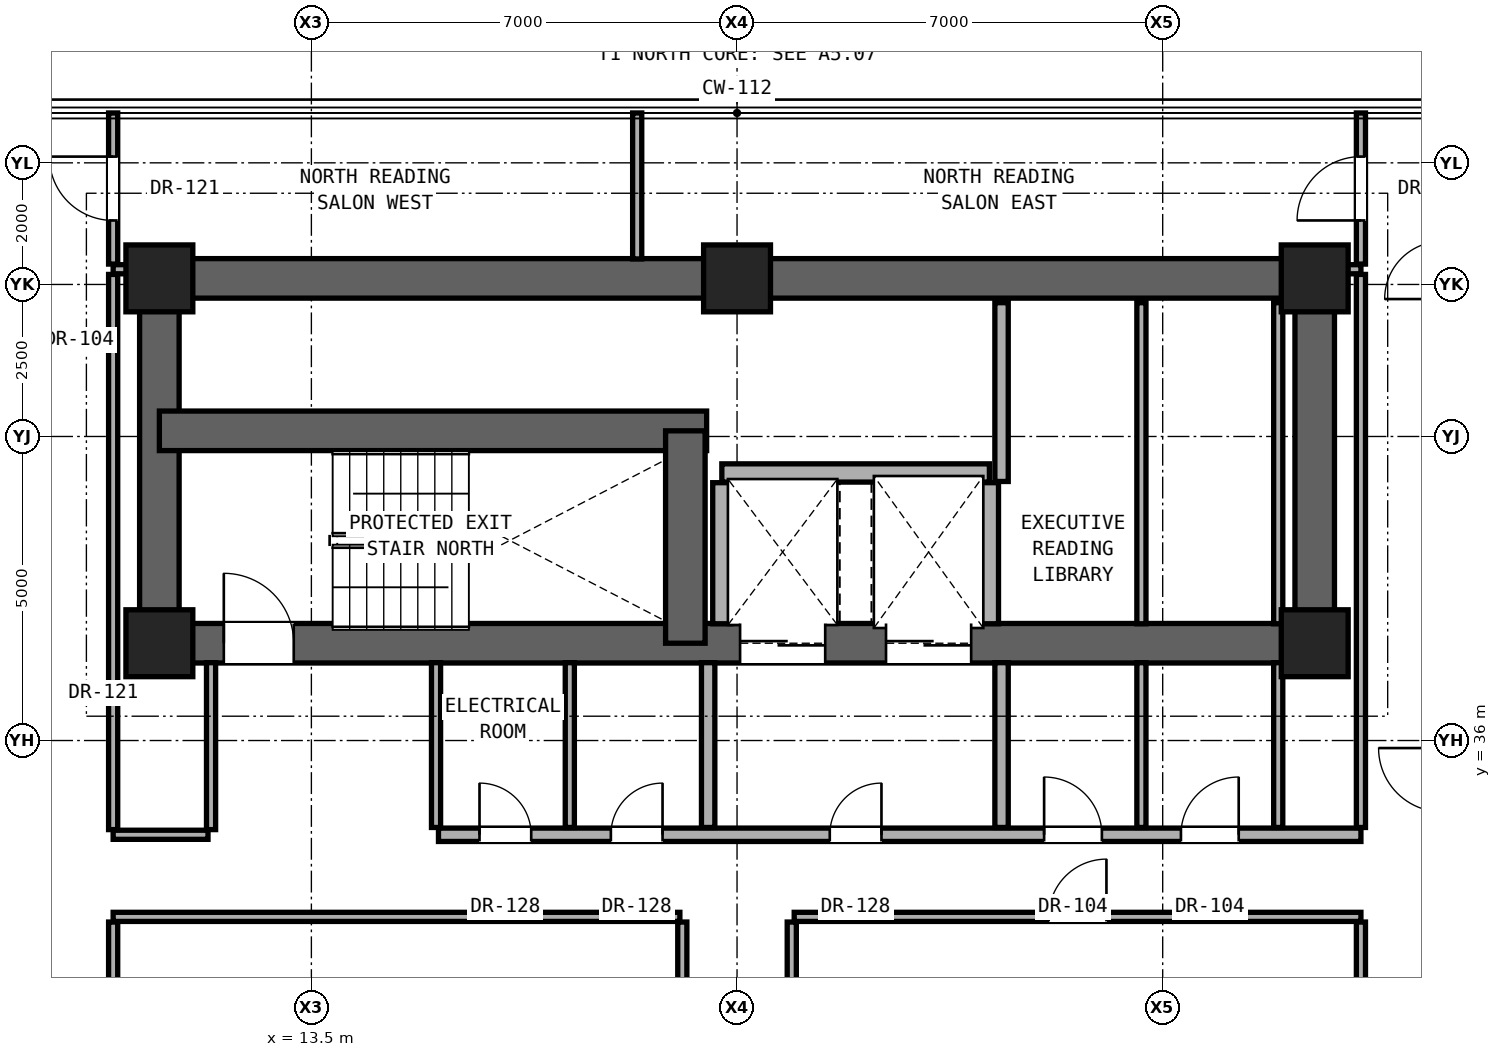
"""IFC4 building model, lengths in metres.
Left out: names, types, materials, properties, quantities, classifications, styles, units other than length and angle.
Written with IfcOpenShell. Run it as: python <this file> out.ifc"""

import sys

from ifc_helpers import new_model, si_unit, direction, frame, frame_2d, origin, origin_2d, place, context, subcontext, project, spatial, rectangle, extrude, element, fill, save


model = new_model("IFC4")
c1 = context("Model", 3, precision=1e-05, world=origin(), true_north=direction((0.0, 1.0)))
c2 = subcontext(c1, "Body", "Model", "MODEL_VIEW")
j1 = project(units=[si_unit("LENGTHUNIT", "METRE"), si_unit("PLANEANGLEUNIT", "RADIAN")], contexts=[c1])
p1 = place(None, origin())
s1 = spatial("IfcSite", under=j1, at=p1, CompositionType="ELEMENT")
p2 = place(p1, origin())
s2 = spatial("IfcBuilding", under=s1, at=p2, CompositionType="ELEMENT")
p3 = place(p2, frame((0.0, 0.0, 118.1)))
s3 = spatial("IfcBuildingStorey", under=s2, at=p3, CompositionType="ELEMENT", Elevation=118.1)
for number, where, z_axis, x_axis in (
    (1, (11.0, 37.6, 0.0), (0.0, 0.0, 1.0), (1.0, 0.0, 0.0)),
    (2, (30.0, 37.6, 0.0), (0.0, 0.0, 1.0), (1.0, 0.0, 0.0)),
    (3, (11.0, 43.6, 0.0), (0.0, 0.0, 1.0), (1.0, 0.0, 0.0)),
    (4, (20.5, 43.6, 0.0), (0.0, 0.0, 1.0), (1.0, 0.0, 0.0)),
    (5, (30.0, 43.6, 0.0), (0.0, 0.0, 1.0), (1.0, 0.0, 0.0)),
):
    element("IfcColumn", number, at=place(p3, frame(where, z_axis=z_axis, x_axis=x_axis)), inside=s3, PredefinedType="COLUMN", context=c2, shape_type="SweptSolid", body=[
        extrude(rectangle(XDim=1.1, YDim=1.1, at=origin_2d()), origin(), (0.0, 0.0, 1.0), 3.3),
    ])
p4 = place(p3, frame((11.0, 43.6, 0.0), z_axis=(0.0, 0.0, 1.0), x_axis=(1.0, 0.0, 0.0)))
e6 = element("IfcWall", 6, at=p4, inside=s3, PredefinedType="SHEAR", context=c2, shape_type="SweptSolid", body=[
    extrude(rectangle(XDim=19.0, YDim=0.65, at=frame_2d((9.5, 0.0))), origin(), (0.0, 0.0, 1.0), 3.08),
])
for number, where, z_axis, x_axis in (
    (7, (11.0, 37.6, 0.0), (0.0, 0.0, 1.0), (0.0, 1.0, 0.0)),
    (8, (30.0, 37.6, 0.0), (0.0, 0.0, 1.0), (0.0, 1.0, 0.0)),
):
    element("IfcWall", number, at=place(p3, frame(where, z_axis=z_axis, x_axis=x_axis)), inside=s3, PredefinedType="SHEAR", context=c2, shape_type="SweptSolid", body=[
        extrude(rectangle(XDim=6.0, YDim=0.65, at=frame_2d((3.0, 0.0))), origin(), (0.0, 0.0, 1.0), 3.08),
    ])
p5 = place(p3, frame((11.0, 37.6, 0.0), z_axis=(0.0, 0.0, 1.0), x_axis=(1.0, 0.0, 0.0)))
e9 = element("IfcWall", 9, at=p5, inside=s3, PredefinedType="SHEAR", context=c2, shape_type="SweptSolid", body=[
    extrude(rectangle(XDim=19.0, YDim=0.65, at=frame_2d((9.5, 0.0))), origin(), (0.0, 0.0, 1.0), 3.08),
])
p6 = place(p5, frame((1.06, 0.0, 0.0)))
e10 = element("IfcOpeningElement", 10, at=p6, cuts=e9, PredefinedType="OPENING", context=c2, shape_type="SweptSolid", body=[
    extrude(rectangle(XDim=1.15, YDim=2.2, at=frame_2d((0.575, 1.1))), frame((0.0, 0.335, 0.0), z_axis=(0.0, -1.0, 0.0), x_axis=(1.0, 0.0, 0.0)), (0.0, 0.0, 1.0), 0.67),
])
p7 = place(p5, frame((9.55, 0.0, 0.0)))
e11 = element("IfcOpeningElement", 11, at=p7, cuts=e9, PredefinedType="OPENING", context=c2, shape_type="SweptSolid", body=[
    extrude(rectangle(XDim=1.4, YDim=2.35, at=frame_2d((0.7, 1.175))), frame((0.0, 0.335, 0.0), z_axis=(0.0, -1.0, 0.0), x_axis=(1.0, 0.0, 0.0)), (0.0, 0.0, 1.0), 0.67),
])
p8 = place(p5, frame((11.95, 0.0, 0.0)))
e12 = element("IfcOpeningElement", 12, at=p8, cuts=e9, PredefinedType="OPENING", context=c2, shape_type="SweptSolid", body=[
    extrude(rectangle(XDim=1.4, YDim=2.35, at=frame_2d((0.7, 1.175))), frame((0.0, 0.335, 0.0), z_axis=(0.0, -1.0, 0.0), x_axis=(1.0, 0.0, 0.0)), (0.0, 0.0, 1.0), 0.67),
])
p9 = place(p3, frame((11.0, 41.093, 0.0), z_axis=(0.0, 0.0, 1.0), x_axis=(1.0, 0.0, 0.0)))
e13 = element("IfcWall", 13, at=p9, inside=s3, PredefinedType="SHEAR", context=c2, shape_type="SweptSolid", body=[
    extrude(rectangle(XDim=9.0, YDim=0.65, at=frame_2d((4.5, 0.0))), origin(), (0.0, 0.0, 1.0), 3.08),
])
p10 = place(p3, frame((19.65, 37.6, 0.0), z_axis=(0.0, 0.0, 1.0), x_axis=(0.0, 1.0, 0.0)))
e14 = element("IfcWall", 14, at=p10, inside=s3, PredefinedType="SHEAR", context=c2, shape_type="SweptSolid", body=[
    extrude(rectangle(XDim=3.493, YDim=0.65, at=frame_2d((1.747, 0.0))), origin(), (0.0, 0.0, 1.0), 3.08),
])
p11 = place(p3, frame((10.24, 33.1, 0.0), z_axis=(0.0, 0.0, 1.0), x_axis=(1.0, 0.0, 0.0)))
e15 = element("IfcWall", 15, at=p11, inside=s3, PredefinedType="PARTITIONING", context=c2, shape_type="SweptSolid", body=[
    extrude(rectangle(XDim=9.32, YDim=0.15, at=frame_2d((4.66, 0.0))), origin(), (0.0, 0.0, 1.0), 2.216),
])
p12 = place(p3, frame((21.44, 33.1, 0.0), z_axis=(0.0, 0.0, 1.0), x_axis=(1.0, 0.0, 0.0)))
e16 = element("IfcWall", 16, at=p12, inside=s3, PredefinedType="PARTITIONING", context=c2, shape_type="SweptSolid", body=[
    extrude(rectangle(XDim=9.32, YDim=0.15, at=frame_2d((4.66, 0.0))), origin(), (0.0, 0.0, 1.0), 2.216),
])
p13 = place(p12, frame((4.185, 0.0, 0.0)))
e17 = element("IfcOpeningElement", 17, at=p13, cuts=e16, PredefinedType="OPENING", context=c2, shape_type="SweptSolid", body=[
    extrude(rectangle(XDim=0.95, YDim=2.15, at=frame_2d((0.475, 1.075))), frame((0.0, 0.085, 0.0), z_axis=(0.0, -1.0, 0.0), x_axis=(1.0, 0.0, 0.0)), (0.0, 0.0, 1.0), 0.17),
])
p14 = place(p3, frame((10.24, 34.45, 0.0), z_axis=(0.0, 0.0, 1.0), x_axis=(1.0, 0.0, 0.0)))
e18 = element("IfcWall", 18, at=p14, inside=s3, PredefinedType="PARTITIONING", context=c2, shape_type="SweptSolid", body=[
    extrude(rectangle(XDim=1.56, YDim=0.15, at=frame_2d((0.78, 0.0))), origin(), (0.0, 0.0, 1.0), 2.216),
])
p15 = place(p3, frame((15.59, 34.45, 0.0), z_axis=(0.0, 0.0, 1.0), x_axis=(1.0, 0.0, 0.0)))
e19 = element("IfcWall", 19, at=p15, inside=s3, PredefinedType="SOLIDWALL", context=c2, shape_type="SweptSolid", body=[
    extrude(rectangle(XDim=15.17, YDim=0.22, at=frame_2d((7.585, 0.0))), origin(), (0.0, 0.0, 1.0), 2.216),
])
p16 = place(p15, frame((6.435, 0.0, 0.0)))
e20 = element("IfcOpeningElement", 20, at=p16, cuts=e19, PredefinedType="OPENING", context=c2, shape_type="SweptSolid", body=[
    extrude(rectangle(XDim=0.85, YDim=2.01, at=frame_2d((0.425, 1.005))), frame((0.0, 0.12, 0.0), z_axis=(0.0, -1.0, 0.0), x_axis=(1.0, 0.0, 0.0)), (0.0, 0.0, 1.0), 0.24),
])
p17 = place(p15, frame((9.96, 0.0, 0.0)))
e21 = element("IfcOpeningElement", 21, at=p17, cuts=e19, PredefinedType="OPENING", context=c2, shape_type="SweptSolid", body=[
    extrude(rectangle(XDim=0.95, YDim=2.15, at=frame_2d((0.475, 1.075))), frame((0.0, 0.12, 0.0), z_axis=(0.0, -1.0, 0.0), x_axis=(1.0, 0.0, 0.0)), (0.0, 0.0, 1.0), 0.24),
])
p18 = place(p15, frame((12.21, 0.0, 0.0)))
e22 = element("IfcOpeningElement", 22, at=p18, cuts=e19, PredefinedType="OPENING", context=c2, shape_type="SweptSolid", body=[
    extrude(rectangle(XDim=0.95, YDim=2.15, at=frame_2d((0.475, 1.075))), frame((0.0, 0.12, 0.0), z_axis=(0.0, -1.0, 0.0), x_axis=(1.0, 0.0, 0.0)), (0.0, 0.0, 1.0), 0.24),
])
p19 = place(p15, frame((0.675, 0.0, 0.0)))
e23 = element("IfcOpeningElement", 23, at=p19, cuts=e19, PredefinedType="OPENING", context=c2, shape_type="SweptSolid", body=[
    extrude(rectangle(XDim=0.85, YDim=2.01, at=frame_2d((0.425, 1.005))), frame((0.0, 0.12, 0.0), z_axis=(0.0, -1.0, 0.0), x_axis=(1.0, 0.0, 0.0)), (0.0, 0.0, 1.0), 0.24),
])
p20 = place(p15, frame((2.835, 0.0, 0.0)))
e24 = element("IfcOpeningElement", 24, at=p20, cuts=e19, PredefinedType="OPENING", context=c2, shape_type="SweptSolid", body=[
    extrude(rectangle(XDim=0.85, YDim=2.01, at=frame_2d((0.425, 1.005))), frame((0.0, 0.12, 0.0), z_axis=(0.0, -1.0, 0.0), x_axis=(1.0, 0.0, 0.0)), (0.0, 0.0, 1.0), 0.24),
])
p21 = place(p3, frame((20.25, 40.4, 0.0), z_axis=(0.0, 0.0, 1.0), x_axis=(1.0, 0.0, 0.0)))
e25 = element("IfcWall", 25, at=p21, inside=s3, PredefinedType="SOLIDWALL", context=c2, shape_type="SweptSolid", body=[
    extrude(rectangle(XDim=4.4, YDim=0.3, at=frame_2d((2.2, 0.0))), origin(), (0.0, 0.0, 1.0), 3.08),
])
for number, where, z_axis, x_axis in (
    (26, (10.24, 43.75, 0.0), (0.0, 0.0, 1.0), (1.0, 0.0, 0.0)),
    (27, (30.32, 43.75, 0.0), (0.0, 0.0, 1.0), (1.0, 0.0, 0.0)),
):
    element("IfcWall", number, at=place(p3, frame(where, z_axis=z_axis, x_axis=x_axis)), inside=s3, PredefinedType="PARTITIONING", context=c2, shape_type="SweptSolid", body=[
        extrude(rectangle(XDim=0.44, YDim=0.15, at=frame_2d((0.22, 0.0))), origin(), (0.0, 0.0, 1.0), 3.08),
    ])
p22 = place(p3, frame((10.24, 27.485, 0.0), z_axis=(0.0, 0.0, 1.0), x_axis=(0.0, 1.0, 0.0)))
e28 = element("IfcWall", 28, at=p22, inside=s3, PredefinedType="PARTITIONING", context=c2, shape_type="SweptSolid", body=[
    extrude(rectangle(XDim=5.53, YDim=0.15, at=frame_2d((2.765, 0.0))), origin(), (0.0, 0.0, 1.0), 2.299),
])
p23 = place(p22, frame((2.29, 0.0, 0.0)))
e29 = element("IfcOpeningElement", 29, at=p23, cuts=e28, PredefinedType="OPENING", context=c2, shape_type="SweptSolid", body=[
    extrude(rectangle(XDim=0.95, YDim=2.15, at=frame_2d((0.475, 1.075))), frame((0.0, 0.085, 0.0), z_axis=(0.0, -1.0, 0.0), x_axis=(1.0, 0.0, 0.0)), (0.0, 0.0, 1.0), 0.17),
])
p24 = place(p3, frame((10.24, 34.535, 0.0), z_axis=(0.0, 0.0, 1.0), x_axis=(0.0, 1.0, 0.0)))
e30 = element("IfcWall", 30, at=p24, inside=s3, PredefinedType="PARTITIONING", context=c2, shape_type="SweptSolid", body=[
    extrude(rectangle(XDim=9.13, YDim=0.15, at=frame_2d((4.565, 0.0))), origin(), (0.0, 0.0, 1.0), 2.456),
])
p25 = place(p3, frame((10.24, 43.835, 0.0), z_axis=(0.0, 0.0, 1.0), x_axis=(0.0, 1.0, 0.0)))
e31 = element("IfcWall", 31, at=p25, inside=s3, PredefinedType="PARTITIONING", context=c2, shape_type="SweptSolid", body=[
    extrude(rectangle(XDim=2.485, YDim=0.15, at=frame_2d((1.243, 0.0))), origin(), (0.0, 0.0, 1.0), 3.08),
])
p26 = place(p25, frame((0.718, 0.0, 0.0)))
e32 = element("IfcOpeningElement", 32, at=p26, cuts=e31, PredefinedType="OPENING", context=c2, shape_type="SweptSolid", body=[
    extrude(rectangle(XDim=1.05, YDim=2.2, at=frame_2d((0.525, 1.1))), frame((0.0, 0.085, 0.0), z_axis=(0.0, -1.0, 0.0), x_axis=(1.0, 0.0, 0.0)), (0.0, 0.0, 1.0), 0.17),
])
p27 = place(p3, frame((11.85, 34.535, 0.0), z_axis=(0.0, 0.0, 1.0), x_axis=(0.0, 1.0, 0.0)))
e33 = element("IfcWall", 33, at=p27, inside=s3, PredefinedType="PARTITIONING", context=c2, shape_type="SweptSolid", body=[
    extrude(rectangle(XDim=2.745, YDim=0.15, at=frame_2d((1.373, 0.0))), origin(), (0.0, 0.0, 1.0), 3.08),
])
p28 = place(p3, frame((15.55, 34.57, 0.0), z_axis=(0.0, 0.0, 1.0), x_axis=(0.0, 1.0, 0.0)))
e34 = element("IfcWall", 34, at=p28, inside=s3, PredefinedType="PARTITIONING", context=c2, shape_type="SweptSolid", body=[
    extrude(rectangle(XDim=2.71, YDim=0.15, at=frame_2d((1.355, 0.0))), origin(), (0.0, 0.0, 1.0), 2.609),
])
p29 = place(p3, frame((17.75, 34.57, 0.0), z_axis=(0.0, 0.0, 1.0), x_axis=(0.0, 1.0, 0.0)))
e35 = element("IfcWall", 35, at=p29, inside=s3, PredefinedType="PARTITIONING", context=c2, shape_type="SweptSolid", body=[
    extrude(rectangle(XDim=2.71, YDim=0.15, at=frame_2d((1.355, 0.0))), origin(), (0.0, 0.0, 1.0), 3.08),
])
p30 = place(p3, frame((18.858, 43.92, 0.0), z_axis=(0.0, 0.0, 1.0), x_axis=(0.0, 1.0, 0.0)))
e36 = element("IfcWall", 36, at=p30, inside=s3, PredefinedType="PARTITIONING", context=c2, shape_type="SweptSolid", body=[
    extrude(rectangle(XDim=2.4, YDim=0.15, at=frame_2d((1.2, 0.0))), origin(), (0.0, 0.0, 1.0), 3.08),
])
p31 = place(p3, frame((19.6, 27.485, 0.0), z_axis=(0.0, 0.0, 1.0), x_axis=(0.0, 1.0, 0.0)))
e37 = element("IfcWall", 37, at=p31, inside=s3, PredefinedType="PARTITIONING", context=c2, shape_type="SweptSolid", body=[
    extrude(rectangle(XDim=5.53, YDim=0.15, at=frame_2d((2.765, 0.0))), origin(), (0.0, 0.0, 1.0), 2.216),
])
p32 = place(p3, frame((20.025, 34.57, 0.0), z_axis=(0.0, 0.0, 1.0), x_axis=(0.0, 1.0, 0.0)))
e38 = element("IfcWall", 38, at=p32, inside=s3, PredefinedType="SOLIDWALL", context=c2, shape_type="SweptSolid", body=[
    extrude(rectangle(XDim=2.71, YDim=0.22, at=frame_2d((1.355, 0.0))), origin(), (0.0, 0.0, 1.0), 3.08),
])
p33 = place(p3, frame((20.25, 37.92, 0.0), z_axis=(0.0, 0.0, 1.0), x_axis=(0.0, 1.0, 0.0)))
e39 = element("IfcWall", 39, at=p33, inside=s3, PredefinedType="SOLIDWALL", context=c2, shape_type="SweptSolid", body=[
    extrude(rectangle(XDim=2.32, YDim=0.3, at=frame_2d((1.16, 0.0))), origin(), (0.0, 0.0, 1.0), 3.08),
])
p34 = place(p3, frame((21.4, 27.485, 0.0), z_axis=(0.0, 0.0, 1.0), x_axis=(0.0, 1.0, 0.0)))
e40 = element("IfcWall", 40, at=p34, inside=s3, PredefinedType="PARTITIONING", context=c2, shape_type="SweptSolid", body=[
    extrude(rectangle(XDim=5.53, YDim=0.15, at=frame_2d((2.765, 0.0))), origin(), (0.0, 0.0, 1.0), 2.216),
])
p35 = place(p3, frame((24.65, 37.92, 0.0), z_axis=(0.0, 0.0, 1.0), x_axis=(0.0, 1.0, 0.0)))
e41 = element("IfcWall", 41, at=p35, inside=s3, PredefinedType="SOLIDWALL", context=c2, shape_type="SweptSolid", body=[
    extrude(rectangle(XDim=2.32, YDim=0.3, at=frame_2d((1.16, 0.0))), origin(), (0.0, 0.0, 1.0), 3.08),
])
p36 = place(p3, frame((24.85, 34.57, 0.0), z_axis=(0.0, 0.0, 1.0), x_axis=(0.0, 1.0, 0.0)))
e42 = element("IfcWall", 42, at=p36, inside=s3, PredefinedType="SOLIDWALL", context=c2, shape_type="SweptSolid", body=[
    extrude(rectangle(XDim=2.71, YDim=0.22, at=frame_2d((1.355, 0.0))), origin(), (0.0, 0.0, 1.0), 3.08),
])
p37 = place(p3, frame((24.85, 40.26, 0.0), z_axis=(0.0, 0.0, 1.0), x_axis=(0.0, 1.0, 0.0)))
e43 = element("IfcWall", 43, at=p37, inside=s3, PredefinedType="SOLIDWALL", context=c2, shape_type="SweptSolid", body=[
    extrude(rectangle(XDim=2.94, YDim=0.22, at=frame_2d((1.47, 0.0))), origin(), (0.0, 0.0, 1.0), 3.08),
])
p38 = place(p3, frame((27.15, 34.57, 0.0), z_axis=(0.0, 0.0, 1.0), x_axis=(0.0, 1.0, 0.0)))
e44 = element("IfcWall", 44, at=p38, inside=s3, PredefinedType="PARTITIONING", context=c2, shape_type="SweptSolid", body=[
    extrude(rectangle(XDim=2.71, YDim=0.15, at=frame_2d((1.355, 0.0))), origin(), (0.0, 0.0, 1.0), 3.08),
])
p39 = place(p3, frame((27.15, 37.92, 0.0), z_axis=(0.0, 0.0, 1.0), x_axis=(0.0, 1.0, 0.0)))
e45 = element("IfcWall", 45, at=p39, inside=s3, PredefinedType="PARTITIONING", context=c2, shape_type="SweptSolid", body=[
    extrude(rectangle(XDim=5.28, YDim=0.15, at=frame_2d((2.64, 0.0))), origin(), (0.0, 0.0, 1.0), 3.08),
])
p40 = place(p3, frame((29.4, 34.57, 0.0), z_axis=(0.0, 0.0, 1.0), x_axis=(0.0, 1.0, 0.0)))
e46 = element("IfcWall", 46, at=p40, inside=s3, PredefinedType="PARTITIONING", context=c2, shape_type="SweptSolid", body=[
    extrude(rectangle(XDim=2.71, YDim=0.15, at=frame_2d((1.355, 0.0))), origin(), (0.0, 0.0, 1.0), 3.08),
])
p41 = place(p3, frame((29.4, 37.92, 0.0), z_axis=(0.0, 0.0, 1.0), x_axis=(0.0, 1.0, 0.0)))
e47 = element("IfcWall", 47, at=p41, inside=s3, PredefinedType="PARTITIONING", context=c2, shape_type="SweptSolid", body=[
    extrude(rectangle(XDim=5.28, YDim=0.15, at=frame_2d((2.64, 0.0))), origin(), (0.0, 0.0, 1.0), 3.08),
])
p42 = place(p3, frame((30.76, 27.485, 0.0), z_axis=(0.0, 0.0, 1.0), x_axis=(0.0, 1.0, 0.0)))
e48 = element("IfcWall", 48, at=p42, inside=s3, PredefinedType="PARTITIONING", context=c2, shape_type="SweptSolid", body=[
    extrude(rectangle(XDim=5.53, YDim=0.15, at=frame_2d((2.765, 0.0))), origin(), (0.0, 0.0, 1.0), 2.299),
])
p43 = place(p3, frame((30.76, 34.57, 0.0), z_axis=(0.0, 0.0, 1.0), x_axis=(0.0, 1.0, 0.0)))
e49 = element("IfcWall", 49, at=p43, inside=s3, PredefinedType="PARTITIONING", context=c2, shape_type="SweptSolid", body=[
    extrude(rectangle(XDim=9.095, YDim=0.15, at=frame_2d((4.547, 0.0))), origin(), (0.0, 0.0, 1.0), 2.456),
])
p44 = place(p3, frame((30.76, 43.835, 0.0), z_axis=(0.0, 0.0, 1.0), x_axis=(0.0, 1.0, 0.0)))
e50 = element("IfcWall", 50, at=p44, inside=s3, PredefinedType="PARTITIONING", context=c2, shape_type="SweptSolid", body=[
    extrude(rectangle(XDim=2.485, YDim=0.15, at=frame_2d((1.243, 0.0))), origin(), (0.0, 0.0, 1.0), 3.08),
])
p45 = place(p44, frame((0.718, 0.0, 0.0)))
e51 = element("IfcOpeningElement", 51, at=p45, cuts=e50, PredefinedType="OPENING", context=c2, shape_type="SweptSolid", body=[
    extrude(rectangle(XDim=1.05, YDim=2.2, at=frame_2d((0.525, 1.1))), frame((0.0, 0.085, 0.0), z_axis=(0.0, -1.0, 0.0), x_axis=(1.0, 0.0, 0.0)), (0.0, 0.0, 1.0), 0.17),
])
p46 = place(p6, origin())
e52 = element("IfcDoor", 52, at=p46, inside=s3, OperationType="SINGLE_SWING_LEFT", PredefinedType="DOOR", context=c2, shape_type="SweptSolid", body=[
    extrude(rectangle(XDim=1.15, YDim=2.2, at=frame_2d((0.575, 1.1))), frame((0.0, 0.025, 0.0), z_axis=(0.0, -1.0, 0.0), x_axis=(1.0, 0.0, 0.0)), (0.0, 0.0, 1.0), 0.05),
])
fill(e10, e52)
p47 = place(p16, origin())
e53 = element("IfcDoor", 53, at=p47, inside=s3, OperationType="SINGLE_SWING_RIGHT", PredefinedType="DOOR", context=c2, shape_type="SweptSolid", body=[
    extrude(rectangle(XDim=0.85, YDim=2.01, at=frame_2d((0.425, 1.005))), frame((0.0, 0.025, 0.0), z_axis=(0.0, -1.0, 0.0), x_axis=(1.0, 0.0, 0.0)), (0.0, 0.0, 1.0), 0.05),
])
fill(e20, e53)
p48 = place(p17, origin())
e54 = element("IfcDoor", 54, at=p48, inside=s3, OperationType="SINGLE_SWING_LEFT", PredefinedType="DOOR", context=c2, shape_type="SweptSolid", body=[
    extrude(rectangle(XDim=0.95, YDim=2.15, at=frame_2d((0.475, 1.075))), frame((0.0, 0.025, 0.0), z_axis=(0.0, -1.0, 0.0), x_axis=(1.0, 0.0, 0.0)), (0.0, 0.0, 1.0), 0.05),
])
fill(e21, e54)
p49 = place(p18, origin())
e55 = element("IfcDoor", 55, at=p49, inside=s3, OperationType="SINGLE_SWING_RIGHT", PredefinedType="DOOR", context=c2, shape_type="SweptSolid", body=[
    extrude(rectangle(XDim=0.95, YDim=2.15, at=frame_2d((0.475, 1.075))), frame((0.0, 0.025, 0.0), z_axis=(0.0, -1.0, 0.0), x_axis=(1.0, 0.0, 0.0)), (0.0, 0.0, 1.0), 0.05),
])
fill(e22, e55)
p50 = place(p19, origin())
e56 = element("IfcDoor", 56, at=p50, inside=s3, OperationType="SINGLE_SWING_LEFT", PredefinedType="DOOR", context=c2, shape_type="SweptSolid", body=[
    extrude(rectangle(XDim=0.85, YDim=2.01, at=frame_2d((0.425, 1.005))), frame((0.0, 0.025, 0.0), z_axis=(0.0, -1.0, 0.0), x_axis=(1.0, 0.0, 0.0)), (0.0, 0.0, 1.0), 0.05),
])
fill(e23, e56)
p51 = place(p20, origin())
e57 = element("IfcDoor", 57, at=p51, inside=s3, OperationType="SINGLE_SWING_RIGHT", PredefinedType="DOOR", context=c2, shape_type="SweptSolid", body=[
    extrude(rectangle(XDim=0.85, YDim=2.01, at=frame_2d((0.425, 1.005))), frame((0.0, 0.025, 0.0), z_axis=(0.0, -1.0, 0.0), x_axis=(1.0, 0.0, 0.0)), (0.0, 0.0, 1.0), 0.05),
])
fill(e24, e57)
p52 = place(p13, origin())
e58 = element("IfcDoor", 58, at=p52, inside=s3, OperationType="SINGLE_SWING_RIGHT", PredefinedType="DOOR", context=c2, shape_type="SweptSolid", body=[
    extrude(rectangle(XDim=0.95, YDim=2.15, at=frame_2d((0.475, 1.075))), frame((0.0, 0.025, 0.0), z_axis=(0.0, -1.0, 0.0), x_axis=(1.0, 0.0, 0.0)), (0.0, 0.0, 1.0), 0.05),
])
fill(e17, e58)
p53 = place(p26, origin())
e59 = element("IfcDoor", 59, at=p53, inside=s3, OperationType="SINGLE_SWING_RIGHT", PredefinedType="DOOR", context=c2, shape_type="SweptSolid", body=[
    extrude(rectangle(XDim=1.05, YDim=2.2, at=frame_2d((0.525, 1.1))), frame((0.0, 0.025, 0.0), z_axis=(0.0, -1.0, 0.0), x_axis=(1.0, 0.0, 0.0)), (0.0, 0.0, 1.0), 0.05),
])
fill(e32, e59)
p54 = place(p45, origin())
e60 = element("IfcDoor", 60, at=p54, inside=s3, OperationType="SINGLE_SWING_LEFT", PredefinedType="DOOR", context=c2, shape_type="SweptSolid", body=[
    extrude(rectangle(XDim=1.05, YDim=2.2, at=frame_2d((0.525, 1.1))), frame((0.0, 0.025, 0.0), z_axis=(0.0, -1.0, 0.0), x_axis=(1.0, 0.0, 0.0)), (0.0, 0.0, 1.0), 0.05),
])
fill(e51, e60)
p55 = place(p7, origin())
e61 = element("IfcDoor", 61, at=p55, inside=s3, OperationType="DOUBLE_DOOR_SLIDING", PredefinedType="DOOR", context=c2, shape_type="SweptSolid", body=[
    extrude(rectangle(XDim=1.4, YDim=2.35, at=frame_2d((0.7, 1.175))), frame((0.0, 0.025, 0.0), z_axis=(0.0, -1.0, 0.0), x_axis=(1.0, 0.0, 0.0)), (0.0, 0.0, 1.0), 0.05),
])
fill(e11, e61)
p56 = place(p8, origin())
e62 = element("IfcDoor", 62, at=p56, inside=s3, OperationType="DOUBLE_DOOR_SLIDING", PredefinedType="DOOR", context=c2, shape_type="SweptSolid", body=[
    extrude(rectangle(XDim=1.4, YDim=2.35, at=frame_2d((0.7, 1.175))), frame((0.0, 0.025, 0.0), z_axis=(0.0, -1.0, 0.0), x_axis=(1.0, 0.0, 0.0)), (0.0, 0.0, 1.0), 0.05),
])
fill(e12, e62)
save(model, sys.argv[1])
